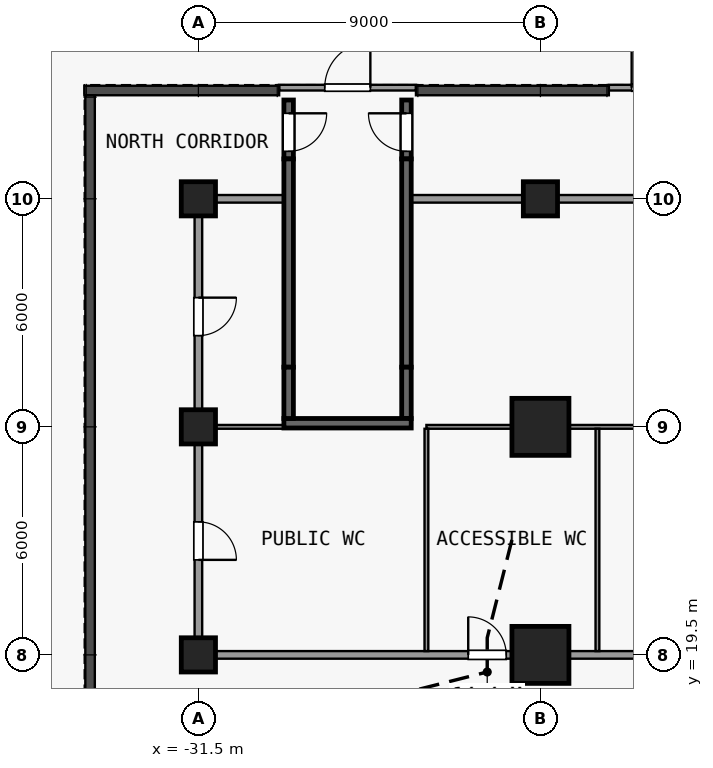
"""IFC4 building model, lengths in metres.
Left out: names, types, materials, properties, quantities, classifications, styles, units other than length and angle.
Written with IfcOpenShell. Run it as: python <this file> out.ifc"""

import sys

from ifc_helpers import new_model, si_unit, direction, frame, frame_2d, origin, origin_2d, place, context, subcontext, project, spatial, rectangle, extrude, element, fill, save


model = new_model("IFC4")
c1 = context("Model", 3, precision=1e-05, world=origin(), true_north=direction((0.0, 1.0)))
c2 = subcontext(c1, "Body", "Model", "MODEL_VIEW")
j1 = project(units=[si_unit("LENGTHUNIT", "METRE"), si_unit("PLANEANGLEUNIT", "RADIAN")], contexts=[c1])
p1 = place(None, origin())
s1 = spatial("IfcSite", under=j1, at=p1, CompositionType="ELEMENT")
p2 = place(p1, origin())
s2 = spatial("IfcBuilding", under=s1, at=p2, CompositionType="ELEMENT")
p3 = place(p2, origin())
s3 = spatial("IfcBuildingStorey", under=s2, at=p3, CompositionType="ELEMENT", Elevation=0.0)
for number, where, z_axis, x_axis in (
    (1, (-31.5, 19.5, 0.0), (0.0, 0.0, 1.0), (1.0, 0.0, 0.0)),
    (2, (-31.5, 25.5, 0.0), (0.0, 0.0, 1.0), (1.0, 0.0, 0.0)),
    (3, (-31.5, 31.5, 0.0), (0.0, 0.0, 1.0), (1.0, 0.0, 0.0)),
):
    element("IfcColumn", number, at=place(p3, frame(where, z_axis=z_axis, x_axis=x_axis)), inside=s3, PredefinedType="COLUMN", context=c2, shape_type="SweptSolid", body=[
        extrude(rectangle(XDim=0.9, YDim=0.9, at=origin_2d()), origin(), (0.0, 0.0, 1.0), 8.0),
    ])
for number, where, z_axis, x_axis in (
    (4, (-22.5, 19.5, 0.0), (0.0, 0.0, 1.0), (1.0, 0.0, 0.0)),
    (5, (-22.5, 25.5, 0.0), (0.0, 0.0, 1.0), (1.0, 0.0, 0.0)),
):
    element("IfcColumn", number, at=place(p3, frame(where, z_axis=z_axis, x_axis=x_axis)), inside=s3, PredefinedType="COLUMN", context=c2, shape_type="SweptSolid", body=[
        extrude(rectangle(XDim=1.5, YDim=1.5, at=origin_2d()), origin(), (0.0, 0.0, 1.0), 8.0),
    ])
p4 = place(p3, frame((-22.5, 31.5, 0.0), z_axis=(0.0, 0.0, 1.0), x_axis=(1.0, 0.0, 0.0)))
e6 = element("IfcColumn", 6, at=p4, inside=s3, PredefinedType="COLUMN", context=c2, shape_type="SweptSolid", body=[
    extrude(rectangle(XDim=0.9, YDim=0.9, at=origin_2d()), origin(), (0.0, 0.0, 1.0), 8.0),
])
p5 = place(p3, frame((-29.375, 34.425, 0.0), z_axis=(0.0, 0.0, 1.0), x_axis=(1.0, 0.0, 0.0)))
e7 = element("IfcWall", 7, at=p5, inside=s3, PredefinedType="SOLIDWALL", context=c2, shape_type="SweptSolid", body=[
    extrude(rectangle(XDim=3.6, YDim=0.15, at=frame_2d((1.8, 0.0))), origin(), (0.0, 0.0, 1.0), 7.65),
])
p6 = place(p5, frame((1.2, 0.0, 0.0)))
e8 = element("IfcOpeningElement", 8, at=p6, cuts=e7, PredefinedType="OPENING", context=c2, shape_type="SweptSolid", body=[
    extrude(rectangle(XDim=1.2, YDim=2.4, at=frame_2d((0.6, 1.2))), frame((0.0, 0.085, 0.0), z_axis=(0.0, -1.0, 0.0), x_axis=(1.0, 0.0, 0.0)), (0.0, 0.0, 1.0), 0.17),
])
p7 = place(p3, frame((-20.7, 34.425, 0.0), z_axis=(0.0, 0.0, 1.0), x_axis=(1.0, 0.0, 0.0)))
e9 = element("IfcWall", 9, at=p7, inside=s3, PredefinedType="SOLIDWALL", context=c2, shape_type="SweptSolid", body=[
    extrude(rectangle(XDim=2.4, YDim=0.15, at=frame_2d((1.2, 0.0))), origin(), (0.0, 0.0, 1.0), 7.65),
])
p8 = place(p7, frame((0.6, 0.0, 0.0)))
e10 = element("IfcOpeningElement", 10, at=p8, cuts=e9, PredefinedType="OPENING", context=c2, shape_type="SweptSolid", body=[
    extrude(rectangle(XDim=1.2, YDim=2.4, at=frame_2d((0.6, 1.2))), frame((0.0, 0.085, 0.0), z_axis=(0.0, -1.0, 0.0), x_axis=(1.0, 0.0, 0.0)), (0.0, 0.0, 1.0), 0.17),
])
p9 = place(p3, frame((-29.125, 34.1, 0.0), z_axis=(0.0, 0.0, 1.0), x_axis=(0.0, -1.0, 0.0)))
e11 = element("IfcWall", 11, at=p9, inside=s3, PredefinedType="SHEAR", context=c2, shape_type="SweptSolid", body=[
    extrude(rectangle(XDim=1.55, YDim=0.25, at=frame_2d((0.775, 0.0))), origin(), (0.0, 0.0, 1.0), 7.65),
])
p10 = place(p9, frame((0.35, 0.0, 0.0)))
e12 = element("IfcOpeningElement", 12, at=p10, cuts=e11, PredefinedType="OPENING", context=c2, shape_type="SweptSolid", body=[
    extrude(rectangle(XDim=1.0, YDim=2.1, at=frame_2d((0.5, 1.05))), frame((0.0, 0.135, 0.0), z_axis=(0.0, -1.0, 0.0), x_axis=(1.0, 0.0, 0.0)), (0.0, 0.0, 1.0), 0.27),
])
p11 = place(p3, frame((-29.125, 27.07, 0.0), z_axis=(0.0, 0.0, 1.0), x_axis=(0.0, 1.0, 0.0)))
e13 = element("IfcWall", 13, at=p11, inside=s3, PredefinedType="SHEAR", context=c2, shape_type="SweptSolid", body=[
    extrude(rectangle(XDim=5.48, YDim=0.25, at=frame_2d((2.74, 0.0))), origin(), (0.0, 0.0, 1.0), 7.65),
])
p12 = place(p3, frame((-29.125, 25.72, 0.0), z_axis=(0.0, 0.0, 1.0), x_axis=(0.0, 1.0, 0.0)))
e14 = element("IfcWall", 14, at=p12, inside=s3, PredefinedType="SHEAR", context=c2, shape_type="SweptSolid", body=[
    extrude(rectangle(XDim=1.35, YDim=0.25, at=frame_2d((0.675, 0.0))), origin(), (0.0, 0.0, 1.0), 7.65),
])
p13 = place(p3, frame((-26.025, 32.55, 0.0), z_axis=(0.0, 0.0, 1.0), x_axis=(0.0, 1.0, 0.0)))
e15 = element("IfcWall", 15, at=p13, inside=s3, PredefinedType="SHEAR", context=c2, shape_type="SweptSolid", body=[
    extrude(rectangle(XDim=1.55, YDim=0.25, at=frame_2d((0.775, 0.0))), origin(), (0.0, 0.0, 1.0), 7.65),
])
p14 = place(p13, frame((0.2, 0.0, 0.0)))
e16 = element("IfcOpeningElement", 16, at=p14, cuts=e15, PredefinedType="OPENING", context=c2, shape_type="SweptSolid", body=[
    extrude(rectangle(XDim=1.0, YDim=2.1, at=frame_2d((0.5, 1.05))), frame((0.0, 0.135, 0.0), z_axis=(0.0, -1.0, 0.0), x_axis=(1.0, 0.0, 0.0)), (0.0, 0.0, 1.0), 0.27),
])
p15 = place(p3, frame((-26.025, 27.07, 0.0), z_axis=(0.0, 0.0, 1.0), x_axis=(0.0, 1.0, 0.0)))
e17 = element("IfcWall", 17, at=p15, inside=s3, PredefinedType="SHEAR", context=c2, shape_type="SweptSolid", body=[
    extrude(rectangle(XDim=5.48, YDim=0.25, at=frame_2d((2.74, 0.0))), origin(), (0.0, 0.0, 1.0), 7.65),
])
p16 = place(p3, frame((-26.025, 25.72, 0.0), z_axis=(0.0, 0.0, 1.0), x_axis=(0.0, 1.0, 0.0)))
e18 = element("IfcWall", 18, at=p16, inside=s3, PredefinedType="SHEAR", context=c2, shape_type="SweptSolid", body=[
    extrude(rectangle(XDim=1.35, YDim=0.25, at=frame_2d((0.675, 0.0))), origin(), (0.0, 0.0, 1.0), 7.65),
])
p17 = place(p3, frame((-29.25, 25.595, 0.0), z_axis=(0.0, 0.0, 1.0), x_axis=(1.0, 0.0, 0.0)))
e19 = element("IfcWall", 19, at=p17, inside=s3, PredefinedType="SHEAR", context=c2, shape_type="SweptSolid", body=[
    extrude(rectangle(XDim=3.35, YDim=0.25, at=frame_2d((1.675, 0.0))), origin(), (0.0, 0.0, 1.0), 7.65),
])
p18 = place(p3, frame((-31.6, 19.5, 0.0), z_axis=(0.0, 0.0, 1.0), x_axis=(1.0, 0.0, 0.0)))
e20 = element("IfcWall", 20, at=p18, inside=s3, PredefinedType="PARTITIONING", context=c2, shape_type="SweptSolid", body=[
    extrude(rectangle(XDim=54.75, YDim=0.2, at=frame_2d((27.375, 0.0))), origin(), (0.0, 0.0, 1.0), 7.65),
])
p19 = place(p18, frame((7.2, 0.0, 0.0)))
e21 = element("IfcOpeningElement", 21, at=p19, cuts=e20, PredefinedType="OPENING", context=c2, shape_type="SweptSolid", body=[
    extrude(rectangle(XDim=1.0, YDim=2.1, at=frame_2d((0.5, 1.05))), frame((0.0, 0.11, 0.0), z_axis=(0.0, -1.0, 0.0), x_axis=(1.0, 0.0, 0.0)), (0.0, 0.0, 1.0), 0.22),
])
p20 = place(p18, frame((16.0, 0.0, 0.0)))
e22 = element("IfcOpeningElement", 22, at=p20, cuts=e20, PredefinedType="OPENING", context=c2, shape_type="SweptSolid", body=[
    extrude(rectangle(XDim=1.0, YDim=2.1, at=frame_2d((0.5, 1.05))), frame((0.0, 0.11, 0.0), z_axis=(0.0, -1.0, 0.0), x_axis=(1.0, 0.0, 0.0)), (0.0, 0.0, 1.0), 0.22),
])
p21 = place(p18, frame((32.5, 0.0, 0.0)))
e23 = element("IfcOpeningElement", 23, at=p21, cuts=e20, PredefinedType="OPENING", context=c2, shape_type="SweptSolid", body=[
    extrude(rectangle(XDim=1.0, YDim=2.1, at=frame_2d((0.5, 1.05))), frame((0.0, 0.11, 0.0), z_axis=(0.0, -1.0, 0.0), x_axis=(1.0, 0.0, 0.0)), (0.0, 0.0, 1.0), 0.22),
])
p22 = place(p18, frame((46.2, 0.0, 0.0)))
e24 = element("IfcOpeningElement", 24, at=p22, cuts=e20, PredefinedType="OPENING", context=c2, shape_type="SweptSolid", body=[
    extrude(rectangle(XDim=1.0, YDim=2.1, at=frame_2d((0.5, 1.05))), frame((0.0, 0.11, 0.0), z_axis=(0.0, -1.0, 0.0), x_axis=(1.0, 0.0, 0.0)), (0.0, 0.0, 1.0), 0.22),
])
p23 = place(p3, frame((-31.4, 25.5, 0.0), z_axis=(0.0, 0.0, 1.0), x_axis=(1.0, 0.0, 0.0)))
e25 = element("IfcWall", 25, at=p23, inside=s3, PredefinedType="PARTITIONING", context=c2, shape_type="SweptSolid", body=[
    extrude(rectangle(XDim=2.15, YDim=0.1, at=frame_2d((1.075, 0.0))), origin(), (0.0, 0.0, 1.0), 7.65),
])
p24 = place(p3, frame((-25.5, 25.5, 0.0), z_axis=(0.0, 0.0, 1.0), x_axis=(1.0, 0.0, 0.0)))
e26 = element("IfcWall", 26, at=p24, inside=s3, PredefinedType="PARTITIONING", context=c2, shape_type="SweptSolid", body=[
    extrude(rectangle(XDim=48.65, YDim=0.1, at=frame_2d((24.325, 0.0))), origin(), (0.0, 0.0, 1.0), 7.65),
])
p25 = place(p3, frame((-31.6, 31.5, 0.0), z_axis=(0.0, 0.0, 1.0), x_axis=(1.0, 0.0, 0.0)))
e27 = element("IfcWall", 27, at=p25, inside=s3, PredefinedType="PARTITIONING", context=c2, shape_type="SweptSolid", body=[
    extrude(rectangle(XDim=2.35, YDim=0.2, at=frame_2d((1.175, 0.0))), origin(), (0.0, 0.0, 1.0), 7.65),
])
p26 = place(p3, frame((-25.9, 31.5, 0.0), z_axis=(0.0, 0.0, 1.0), x_axis=(1.0, 0.0, 0.0)))
e28 = element("IfcWall", 28, at=p26, inside=s3, PredefinedType="PARTITIONING", context=c2, shape_type="SweptSolid", body=[
    extrude(rectangle(XDim=49.05, YDim=0.2, at=frame_2d((24.525, 0.0))), origin(), (0.0, 0.0, 1.0), 7.65),
])
p27 = place(p26, frame((10.0, 0.0, 0.0)))
e29 = element("IfcOpeningElement", 29, at=p27, cuts=e28, PredefinedType="OPENING", context=c2, shape_type="SweptSolid", body=[
    extrude(rectangle(XDim=1.0, YDim=2.1, at=frame_2d((0.5, 1.05))), frame((0.0, 0.11, 0.0), z_axis=(0.0, -1.0, 0.0), x_axis=(1.0, 0.0, 0.0)), (0.0, 0.0, 1.0), 0.22),
])
p28 = place(p26, frame((38.7, 0.0, 0.0)))
e30 = element("IfcOpeningElement", 30, at=p28, cuts=e28, PredefinedType="OPENING", context=c2, shape_type="SweptSolid", body=[
    extrude(rectangle(XDim=1.0, YDim=2.1, at=frame_2d((0.5, 1.05))), frame((0.0, 0.11, 0.0), z_axis=(0.0, -1.0, 0.0), x_axis=(1.0, 0.0, 0.0)), (0.0, 0.0, 1.0), 0.22),
])
p29 = place(p3, frame((-31.5, 19.6, 0.0), z_axis=(0.0, 0.0, 1.0), x_axis=(0.0, 1.0, 0.0)))
e31 = element("IfcWall", 31, at=p29, inside=s3, PredefinedType="PARTITIONING", context=c2, shape_type="SweptSolid", body=[
    extrude(rectangle(XDim=11.8, YDim=0.2, at=frame_2d((5.9, 0.0))), origin(), (0.0, 0.0, 1.0), 7.65),
])
p30 = place(p29, frame((2.4, 0.0, 0.0)))
e32 = element("IfcOpeningElement", 32, at=p30, cuts=e31, PredefinedType="OPENING", context=c2, shape_type="SweptSolid", body=[
    extrude(rectangle(XDim=1.0, YDim=2.1, at=frame_2d((0.5, 1.05))), frame((0.0, 0.11, 0.0), z_axis=(0.0, -1.0, 0.0), x_axis=(1.0, 0.0, 0.0)), (0.0, 0.0, 1.0), 0.22),
])
p31 = place(p29, frame((8.3, 0.0, 0.0)))
e33 = element("IfcOpeningElement", 33, at=p31, cuts=e31, PredefinedType="OPENING", context=c2, shape_type="SweptSolid", body=[
    extrude(rectangle(XDim=1.0, YDim=2.1, at=frame_2d((0.5, 1.05))), frame((0.0, 0.11, 0.0), z_axis=(0.0, -1.0, 0.0), x_axis=(1.0, 0.0, 0.0)), (0.0, 0.0, 1.0), 0.22),
])
for number, where, z_axis, x_axis in (
    (34, (-25.5, 19.6, 0.0), (0.0, 0.0, 1.0), (0.0, 1.0, 0.0)),
    (35, (-21.0, 19.6, 0.0), (0.0, 0.0, 1.0), (0.0, 1.0, 0.0)),
):
    element("IfcWall", number, at=place(p3, frame(where, z_axis=z_axis, x_axis=x_axis)), inside=s3, PredefinedType="PARTITIONING", context=c2, shape_type="SweptSolid", body=[
        extrude(rectangle(XDim=5.85, YDim=0.1, at=frame_2d((2.925, 0.0))), origin(), (0.0, 0.0, 1.0), 7.65),
    ])
p32 = place(p6, origin())
e36 = element("IfcDoor", 36, at=p32, inside=s3, OperationType="SINGLE_SWING_RIGHT", PredefinedType="DOOR", context=c2, shape_type="SweptSolid", body=[
    extrude(rectangle(XDim=1.2, YDim=2.4, at=frame_2d((0.6, 1.2))), frame((0.0, 0.025, 0.0), z_axis=(0.0, -1.0, 0.0), x_axis=(1.0, 0.0, 0.0)), (0.0, 0.0, 1.0), 0.05),
])
fill(e8, e36)
p33 = place(p8, origin())
e37 = element("IfcDoor", 37, at=p33, inside=s3, OperationType="SINGLE_SWING_LEFT", PredefinedType="DOOR", context=c2, shape_type="SweptSolid", body=[
    extrude(rectangle(XDim=1.2, YDim=2.4, at=frame_2d((0.6, 1.2))), frame((0.0, 0.025, 0.0), z_axis=(0.0, -1.0, 0.0), x_axis=(1.0, 0.0, 0.0)), (0.0, 0.0, 1.0), 0.05),
])
fill(e10, e37)
p34 = place(p10, origin())
e38 = element("IfcDoor", 38, at=p34, inside=s3, OperationType="SINGLE_SWING_LEFT", PredefinedType="DOOR", context=c2, shape_type="SweptSolid", body=[
    extrude(rectangle(XDim=1.0, YDim=2.1, at=frame_2d((0.5, 1.05))), frame((0.0, 0.025, 0.0), z_axis=(0.0, -1.0, 0.0), x_axis=(1.0, 0.0, 0.0)), (0.0, 0.0, 1.0), 0.05),
])
fill(e12, e38)
p35 = place(p14, origin())
e39 = element("IfcDoor", 39, at=p35, inside=s3, OperationType="SINGLE_SWING_RIGHT", PredefinedType="DOOR", context=c2, shape_type="SweptSolid", body=[
    extrude(rectangle(XDim=1.0, YDim=2.1, at=frame_2d((0.5, 1.05))), frame((0.0, 0.025, 0.0), z_axis=(0.0, -1.0, 0.0), x_axis=(1.0, 0.0, 0.0)), (0.0, 0.0, 1.0), 0.05),
])
fill(e16, e39)
p36 = place(p19, origin())
e40 = element("IfcDoor", 40, at=p36, inside=s3, OperationType="SINGLE_SWING_RIGHT", PredefinedType="DOOR", context=c2, shape_type="SweptSolid", body=[
    extrude(rectangle(XDim=1.0, YDim=2.1, at=frame_2d((0.5, 1.05))), frame((0.0, 0.025, 0.0), z_axis=(0.0, -1.0, 0.0), x_axis=(1.0, 0.0, 0.0)), (0.0, 0.0, 1.0), 0.05),
])
fill(e21, e40)
p37 = place(p30, origin())
e41 = element("IfcDoor", 41, at=p37, inside=s3, OperationType="SINGLE_SWING_LEFT", PredefinedType="DOOR", context=c2, shape_type="SweptSolid", body=[
    extrude(rectangle(XDim=1.0, YDim=2.1, at=frame_2d((0.5, 1.05))), frame((0.0, 0.025, 0.0), z_axis=(0.0, -1.0, 0.0), x_axis=(1.0, 0.0, 0.0)), (0.0, 0.0, 1.0), 0.05),
])
fill(e32, e41)
p38 = place(p31, origin())
e42 = element("IfcDoor", 42, at=p38, inside=s3, OperationType="SINGLE_SWING_RIGHT", PredefinedType="DOOR", context=c2, shape_type="SweptSolid", body=[
    extrude(rectangle(XDim=1.0, YDim=2.1, at=frame_2d((0.5, 1.05))), frame((0.0, 0.025, 0.0), z_axis=(0.0, -1.0, 0.0), x_axis=(1.0, 0.0, 0.0)), (0.0, 0.0, 1.0), 0.05),
])
fill(e33, e42)
save(model, sys.argv[1])
